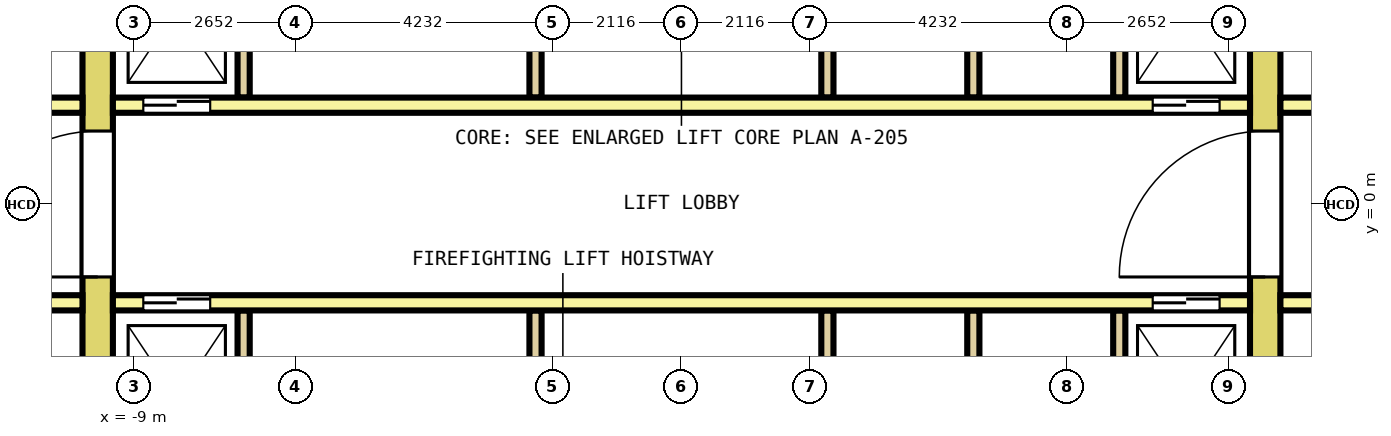
"""IFC4 building model, lengths in metres.
Left out: names, types, materials, properties, quantities, classifications, styles, units other than length and angle.
Written with IfcOpenShell. Run it as: python <this file> out.ifc"""

import sys

from ifc_helpers import new_model, si_unit, direction, frame, frame_2d, origin, place, context, subcontext, project, spatial, rectangle, extrude, element, fill, save


model = new_model("IFC4")
c1 = context("Model", 3, precision=1e-05, world=origin(), true_north=direction((0.0, 1.0)))
c2 = subcontext(c1, "Body", "Model", "MODEL_VIEW")
j1 = project(units=[si_unit("LENGTHUNIT", "METRE"), si_unit("PLANEANGLEUNIT", "RADIAN")], contexts=[c1])
p1 = place(None, origin())
s1 = spatial("IfcSite", under=j1, at=p1, CompositionType="ELEMENT")
p2 = place(p1, origin())
s2 = spatial("IfcBuilding", under=s1, at=p2, CompositionType="ELEMENT")
p3 = place(p2, frame((0.0, 0.0, 14.6)))
s3 = spatial("IfcBuildingStorey", under=s2, at=p3, CompositionType="ELEMENT", Elevation=14.6)
p4 = place(p3, frame((-9.6, -7.7, 0.0), z_axis=(0.0, 0.0, 1.0), x_axis=(0.0, 1.0, 0.0)))
e1 = element("IfcWall", 1, at=p4, inside=s3, PredefinedType="SHEAR", context=c2, shape_type="SweptSolid", body=[
    extrude(rectangle(XDim=15.4, YDim=0.5, at=frame_2d((7.7, 0.0))), origin(), (0.0, 0.0, 1.0), 4.1),
])
p5 = place(p4, frame((6.5, 0.0, 0.0)))
e2 = element("IfcOpeningElement", 2, at=p5, cuts=e1, PredefinedType="OPENING", context=c2, shape_type="SweptSolid", body=[
    extrude(rectangle(XDim=2.4, YDim=2.1, at=frame_2d((1.2, 1.05))), frame((0.0, 0.26, 0.0), z_axis=(0.0, -1.0, 0.0), x_axis=(1.0, 0.0, 0.0)), (0.0, 0.0, 1.0), 0.52),
])
p6 = place(p4, frame((13.4, 0.0, 0.0)))
e3 = element("IfcOpeningElement", 3, at=p6, cuts=e1, PredefinedType="OPENING", context=c2, shape_type="SweptSolid", body=[
    extrude(rectangle(XDim=1.2, YDim=2.1, at=frame_2d((0.6, 1.05))), frame((0.0, 0.26, 0.0), z_axis=(0.0, -1.0, 0.0), x_axis=(1.0, 0.0, 0.0)), (0.0, 0.0, 1.0), 0.52),
])
p7 = place(p4, frame((0.8, 0.0, 0.0)))
e4 = element("IfcOpeningElement", 4, at=p7, cuts=e1, PredefinedType="OPENING", context=c2, shape_type="SweptSolid", body=[
    extrude(rectangle(XDim=1.2, YDim=2.1, at=frame_2d((0.6, 1.05))), frame((0.0, 0.26, 0.0), z_axis=(0.0, -1.0, 0.0), x_axis=(1.0, 0.0, 0.0)), (0.0, 0.0, 1.0), 0.52),
])
p8 = place(p3, frame((9.6, -7.7, 0.0), z_axis=(0.0, 0.0, 1.0), x_axis=(0.0, 1.0, 0.0)))
e5 = element("IfcWall", 5, at=p8, inside=s3, PredefinedType="SHEAR", context=c2, shape_type="SweptSolid", body=[
    extrude(rectangle(XDim=15.4, YDim=0.5, at=frame_2d((7.7, 0.0))), origin(), (0.0, 0.0, 1.0), 4.1),
])
p9 = place(p8, frame((6.5, 0.0, 0.0)))
e6 = element("IfcOpeningElement", 6, at=p9, cuts=e5, PredefinedType="OPENING", context=c2, shape_type="SweptSolid", body=[
    extrude(rectangle(XDim=2.4, YDim=2.1, at=frame_2d((1.2, 1.05))), frame((0.0, 0.26, 0.0), z_axis=(0.0, -1.0, 0.0), x_axis=(1.0, 0.0, 0.0)), (0.0, 0.0, 1.0), 0.52),
])
p10 = place(p8, frame((13.4, 0.0, 0.0)))
e7 = element("IfcOpeningElement", 7, at=p10, cuts=e5, PredefinedType="OPENING", context=c2, shape_type="SweptSolid", body=[
    extrude(rectangle(XDim=1.2, YDim=2.1, at=frame_2d((0.6, 1.05))), frame((0.0, 0.26, 0.0), z_axis=(0.0, -1.0, 0.0), x_axis=(1.0, 0.0, 0.0)), (0.0, 0.0, 1.0), 0.52),
])
p11 = place(p8, frame((0.9, 0.0, 0.0)))
e8 = element("IfcOpeningElement", 8, at=p11, cuts=e5, PredefinedType="OPENING", context=c2, shape_type="SweptSolid", body=[
    extrude(rectangle(XDim=1.0, YDim=2.1, at=frame_2d((0.5, 1.05))), frame((0.0, 0.26, 0.0), z_axis=(0.0, -1.0, 0.0), x_axis=(1.0, 0.0, 0.0)), (0.0, 0.0, 1.0), 0.52),
])
p12 = place(p3, frame((-12.75, 1.625, 0.0), z_axis=(0.0, 0.0, 1.0), x_axis=(1.0, 0.0, 0.0)))
e9 = element("IfcWall", 9, at=p12, inside=s3, PredefinedType="SOLIDWALL", context=c2, shape_type="SweptSolid", body=[
    extrude(rectangle(XDim=2.9, YDim=0.25, at=frame_2d((1.45, 0.0))), origin(), (0.0, 0.0, 1.0), 4.1),
])
p13 = place(p12, frame((0.9, 0.0, 0.0)))
e10 = element("IfcOpeningElement", 10, at=p13, cuts=e9, PredefinedType="OPENING", context=c2, shape_type="SweptSolid", body=[
    extrude(rectangle(XDim=1.1, YDim=2.1, at=frame_2d((0.55, 1.05))), frame((0.0, 0.135, 0.0), z_axis=(0.0, -1.0, 0.0), x_axis=(1.0, 0.0, 0.0)), (0.0, 0.0, 1.0), 0.27),
])
p14 = place(p3, frame((-9.35, 1.625, 0.0), z_axis=(0.0, 0.0, 1.0), x_axis=(1.0, 0.0, 0.0)))
e11 = element("IfcWall", 11, at=p14, inside=s3, PredefinedType="SOLIDWALL", context=c2, shape_type="SweptSolid", body=[
    extrude(rectangle(XDim=18.7, YDim=0.25, at=frame_2d((9.35, 0.0))), origin(), (0.0, 0.0, 1.0), 4.1),
])
p15 = place(p14, frame((0.5, 0.0, 0.0)))
e12 = element("IfcOpeningElement", 12, at=p15, cuts=e11, PredefinedType="OPENING", context=c2, shape_type="SweptSolid", body=[
    extrude(rectangle(XDim=1.1, YDim=2.1, at=frame_2d((0.55, 1.05))), frame((0.0, 0.135, 0.0), z_axis=(0.0, -1.0, 0.0), x_axis=(1.0, 0.0, 0.0)), (0.0, 0.0, 1.0), 0.27),
])
p16 = place(p14, frame((17.1, 0.0, 0.0)))
e13 = element("IfcOpeningElement", 13, at=p16, cuts=e11, PredefinedType="OPENING", context=c2, shape_type="SweptSolid", body=[
    extrude(rectangle(XDim=1.1, YDim=2.1, at=frame_2d((0.55, 1.05))), frame((0.0, 0.135, 0.0), z_axis=(0.0, -1.0, 0.0), x_axis=(1.0, 0.0, 0.0)), (0.0, 0.0, 1.0), 0.27),
])
p17 = place(p3, frame((9.85, 1.625, 0.0), z_axis=(0.0, 0.0, 1.0), x_axis=(1.0, 0.0, 0.0)))
e14 = element("IfcWall", 14, at=p17, inside=s3, PredefinedType="SOLIDWALL", context=c2, shape_type="SweptSolid", body=[
    extrude(rectangle(XDim=2.9, YDim=0.25, at=frame_2d((1.45, 0.0))), origin(), (0.0, 0.0, 1.0), 4.1),
])
p18 = place(p17, frame((0.9, 0.0, 0.0)))
e15 = element("IfcOpeningElement", 15, at=p18, cuts=e14, PredefinedType="OPENING", context=c2, shape_type="SweptSolid", body=[
    extrude(rectangle(XDim=1.1, YDim=2.1, at=frame_2d((0.55, 1.05))), frame((0.0, 0.135, 0.0), z_axis=(0.0, -1.0, 0.0), x_axis=(1.0, 0.0, 0.0)), (0.0, 0.0, 1.0), 0.27),
])
for number, where, z_axis, x_axis in (
    (16, (-7.2, 1.75, 0.0), (0.0, 0.0, 1.0), (0.0, 1.0, 0.0)),
    (17, (-2.4, 1.75, 0.0), (0.0, 0.0, 1.0), (0.0, 1.0, 0.0)),
    (18, (2.4, 1.75, 0.0), (0.0, 0.0, 1.0), (0.0, 1.0, 0.0)),
    (19, (4.8, 1.75, 0.0), (0.0, 0.0, 1.0), (0.0, 1.0, 0.0)),
    (20, (7.2, 1.75, 0.0), (0.0, 0.0, 1.0), (0.0, 1.0, 0.0)),
):
    element("IfcWall", number, at=place(p3, frame(where, z_axis=z_axis, x_axis=x_axis)), inside=s3, PredefinedType="SOLIDWALL", context=c2, shape_type="SweptSolid", body=[
        extrude(rectangle(XDim=2.9, YDim=0.2, at=frame_2d((1.45, 0.0))), origin(), (0.0, 0.0, 1.0), 4.1),
    ])
p19 = place(p3, frame((-12.75, -1.625, 0.0), z_axis=(0.0, 0.0, 1.0), x_axis=(1.0, 0.0, 0.0)))
e21 = element("IfcWall", 21, at=p19, inside=s3, PredefinedType="SOLIDWALL", context=c2, shape_type="SweptSolid", body=[
    extrude(rectangle(XDim=2.9, YDim=0.25, at=frame_2d((1.45, 0.0))), origin(), (0.0, 0.0, 1.0), 4.1),
])
p20 = place(p19, frame((0.9, 0.0, 0.0)))
e22 = element("IfcOpeningElement", 22, at=p20, cuts=e21, PredefinedType="OPENING", context=c2, shape_type="SweptSolid", body=[
    extrude(rectangle(XDim=1.1, YDim=2.1, at=frame_2d((0.55, 1.05))), frame((0.0, 0.135, 0.0), z_axis=(0.0, -1.0, 0.0), x_axis=(1.0, 0.0, 0.0)), (0.0, 0.0, 1.0), 0.27),
])
p21 = place(p3, frame((-9.35, -1.625, 0.0), z_axis=(0.0, 0.0, 1.0), x_axis=(1.0, 0.0, 0.0)))
e23 = element("IfcWall", 23, at=p21, inside=s3, PredefinedType="SOLIDWALL", context=c2, shape_type="SweptSolid", body=[
    extrude(rectangle(XDim=18.7, YDim=0.25, at=frame_2d((9.35, 0.0))), origin(), (0.0, 0.0, 1.0), 4.1),
])
p22 = place(p21, frame((0.5, 0.0, 0.0)))
e24 = element("IfcOpeningElement", 24, at=p22, cuts=e23, PredefinedType="OPENING", context=c2, shape_type="SweptSolid", body=[
    extrude(rectangle(XDim=1.1, YDim=2.1, at=frame_2d((0.55, 1.05))), frame((0.0, 0.135, 0.0), z_axis=(0.0, -1.0, 0.0), x_axis=(1.0, 0.0, 0.0)), (0.0, 0.0, 1.0), 0.27),
])
p23 = place(p21, frame((17.1, 0.0, 0.0)))
e25 = element("IfcOpeningElement", 25, at=p23, cuts=e23, PredefinedType="OPENING", context=c2, shape_type="SweptSolid", body=[
    extrude(rectangle(XDim=1.1, YDim=2.1, at=frame_2d((0.55, 1.05))), frame((0.0, 0.135, 0.0), z_axis=(0.0, -1.0, 0.0), x_axis=(1.0, 0.0, 0.0)), (0.0, 0.0, 1.0), 0.27),
])
p24 = place(p3, frame((9.85, -1.625, 0.0), z_axis=(0.0, 0.0, 1.0), x_axis=(1.0, 0.0, 0.0)))
e26 = element("IfcWall", 26, at=p24, inside=s3, PredefinedType="SOLIDWALL", context=c2, shape_type="SweptSolid", body=[
    extrude(rectangle(XDim=2.9, YDim=0.25, at=frame_2d((1.45, 0.0))), origin(), (0.0, 0.0, 1.0), 4.1),
])
p25 = place(p24, frame((0.9, 0.0, 0.0)))
e27 = element("IfcOpeningElement", 27, at=p25, cuts=e26, PredefinedType="OPENING", context=c2, shape_type="SweptSolid", body=[
    extrude(rectangle(XDim=1.1, YDim=2.1, at=frame_2d((0.55, 1.05))), frame((0.0, 0.135, 0.0), z_axis=(0.0, -1.0, 0.0), x_axis=(1.0, 0.0, 0.0)), (0.0, 0.0, 1.0), 0.27),
])
for number, where, z_axis, x_axis in (
    (28, (-7.2, -4.65, 0.0), (0.0, 0.0, 1.0), (0.0, 1.0, 0.0)),
    (29, (-2.4, -4.65, 0.0), (0.0, 0.0, 1.0), (0.0, 1.0, 0.0)),
    (30, (2.4, -4.65, 0.0), (0.0, 0.0, 1.0), (0.0, 1.0, 0.0)),
    (31, (4.8, -4.65, 0.0), (0.0, 0.0, 1.0), (0.0, 1.0, 0.0)),
    (32, (7.2, -4.65, 0.0), (0.0, 0.0, 1.0), (0.0, 1.0, 0.0)),
):
    element("IfcWall", number, at=place(p3, frame(where, z_axis=z_axis, x_axis=x_axis)), inside=s3, PredefinedType="SOLIDWALL", context=c2, shape_type="SweptSolid", body=[
        extrude(rectangle(XDim=2.9, YDim=0.2, at=frame_2d((1.45, 0.0))), origin(), (0.0, 0.0, 1.0), 4.1),
    ])
p26 = place(p15, origin())
e33 = element("IfcDoor", 33, at=p26, inside=s3, OperationType="DOUBLE_DOOR_SLIDING", PredefinedType="DOOR", context=c2, shape_type="SweptSolid", body=[
    extrude(rectangle(XDim=1.1, YDim=2.1, at=frame_2d((0.55, 1.05))), frame((0.0, 0.075, 0.0), z_axis=(0.0, -1.0, 0.0), x_axis=(1.0, 0.0, 0.0)), (0.0, 0.0, 1.0), 0.15),
])
fill(e12, e33)
p27 = place(p16, origin())
e34 = element("IfcDoor", 34, at=p27, inside=s3, OperationType="DOUBLE_DOOR_SLIDING", PredefinedType="DOOR", context=c2, shape_type="SweptSolid", body=[
    extrude(rectangle(XDim=1.1, YDim=2.1, at=frame_2d((0.55, 1.05))), frame((0.0, 0.075, 0.0), z_axis=(0.0, -1.0, 0.0), x_axis=(1.0, 0.0, 0.0)), (0.0, 0.0, 1.0), 0.15),
])
fill(e13, e34)
p28 = place(p22, origin())
e35 = element("IfcDoor", 35, at=p28, inside=s3, OperationType="DOUBLE_DOOR_SLIDING", PredefinedType="DOOR", context=c2, shape_type="SweptSolid", body=[
    extrude(rectangle(XDim=1.1, YDim=2.1, at=frame_2d((0.55, 1.05))), frame((0.0, 0.075, 0.0), z_axis=(0.0, -1.0, 0.0), x_axis=(1.0, 0.0, 0.0)), (0.0, 0.0, 1.0), 0.15),
])
fill(e24, e35)
p29 = place(p23, origin())
e36 = element("IfcDoor", 36, at=p29, inside=s3, OperationType="DOUBLE_DOOR_SLIDING", PredefinedType="DOOR", context=c2, shape_type="SweptSolid", body=[
    extrude(rectangle(XDim=1.1, YDim=2.1, at=frame_2d((0.55, 1.05))), frame((0.0, 0.075, 0.0), z_axis=(0.0, -1.0, 0.0), x_axis=(1.0, 0.0, 0.0)), (0.0, 0.0, 1.0), 0.15),
])
fill(e25, e36)
p30 = place(p5, origin())
e37 = element("IfcDoor", 37, at=p30, inside=s3, OperationType="DOUBLE_DOOR_SINGLE_SWING", PredefinedType="DOOR", context=c2, shape_type="SweptSolid", body=[
    extrude(rectangle(XDim=2.4, YDim=2.1, at=frame_2d((1.2, 1.05))), frame((0.0, 0.2, 0.0), z_axis=(0.0, -1.0, 0.0), x_axis=(1.0, 0.0, 0.0)), (0.0, 0.0, 1.0), 0.4),
])
fill(e2, e37)
p31 = place(p9, origin())
e38 = element("IfcDoor", 38, at=p31, inside=s3, OperationType="DOUBLE_DOOR_SINGLE_SWING", PredefinedType="DOOR", context=c2, shape_type="SweptSolid", body=[
    extrude(rectangle(XDim=2.4, YDim=2.1, at=frame_2d((1.2, 1.05))), frame((0.0, 0.2, 0.0), z_axis=(0.0, -1.0, 0.0), x_axis=(1.0, 0.0, 0.0)), (0.0, 0.0, 1.0), 0.4),
])
fill(e6, e38)
save(model, sys.argv[1])
